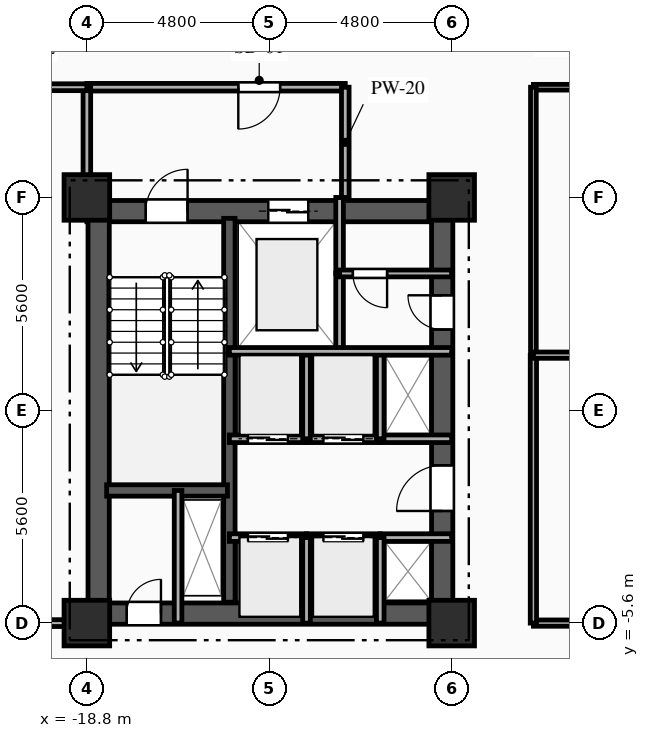
"""IFC4 building model, lengths in metres.
Left out: names, types, materials, properties, quantities, classifications, styles, units other than length and angle.
Written with IfcOpenShell. Run it as: python <this file> out.ifc"""

import sys

from ifc_helpers import new_model, si_unit, direction, frame, frame_2d, origin, origin_2d, place, context, subcontext, project, spatial, rectangle, extrude, element, fill, save


model = new_model("IFC4")
c1 = context("Model", 3, precision=1e-05, world=origin(), true_north=direction((0.0, 1.0)))
c2 = subcontext(c1, "Body", "Model", "MODEL_VIEW")
j1 = project(units=[si_unit("LENGTHUNIT", "METRE"), si_unit("PLANEANGLEUNIT", "RADIAN")], contexts=[c1])
p1 = place(None, origin())
s1 = spatial("IfcSite", under=j1, at=p1, CompositionType="ELEMENT")
p2 = place(p1, origin())
s2 = spatial("IfcBuilding", under=s1, at=p2, CompositionType="ELEMENT")
p3 = place(p2, frame((0.0, 0.0, 60.5)))
s3 = spatial("IfcBuildingStorey", under=s2, at=p3, CompositionType="ELEMENT", Elevation=60.5)
for number, where, z_axis, x_axis in (
    (1, (-18.8, -5.6, 0.0), (0.0, 0.0, 1.0), (1.0, 0.0, 0.0)),
    (2, (-18.8, 5.6, 0.0), (0.0, 0.0, 1.0), (1.0, 0.0, 0.0)),
    (3, (-9.2, -5.6, 0.0), (0.0, 0.0, 1.0), (1.0, 0.0, 0.0)),
    (4, (-9.2, 5.6, 0.0), (0.0, 0.0, 1.0), (1.0, 0.0, 0.0)),
):
    element("IfcColumn", number, at=place(p3, frame(where, z_axis=z_axis, x_axis=x_axis)), inside=s3, PredefinedType="COLUMN", context=c2, shape_type="SweptSolid", body=[
        extrude(rectangle(XDim=1.2, YDim=1.2, at=origin_2d()), origin(), (0.0, 0.0, 1.0), 3.35),
    ])
p4 = place(p3, frame((-18.8, 5.24, 0.0), z_axis=(0.0, 0.0, 1.0), x_axis=(1.0, 0.0, 0.0)))
e5 = element("IfcWall", 5, at=p4, inside=s3, PredefinedType="SHEAR", context=c2, shape_type="SweptSolid", body=[
    extrude(rectangle(XDim=9.6, YDim=0.56, at=frame_2d((4.8, 0.0))), origin(), (0.0, 0.0, 1.0), 3.035),
])
p5 = place(p4, frame((1.55, 0.0, 0.0)))
e6 = element("IfcOpeningElement", 6, at=p5, cuts=e5, PredefinedType="OPENING", context=c2, shape_type="SweptSolid", body=[
    extrude(rectangle(XDim=1.1, YDim=2.15, at=frame_2d((0.55, 1.075))), frame((0.0, 0.29, 0.0), z_axis=(0.0, -1.0, 0.0), x_axis=(1.0, 0.0, 0.0)), (0.0, 0.0, 1.0), 0.58),
])
p6 = place(p4, frame((4.775, 0.0, 0.0)))
e7 = element("IfcOpeningElement", 7, at=p6, cuts=e5, PredefinedType="OPENING", context=c2, shape_type="SweptSolid", body=[
    extrude(rectangle(XDim=1.05, YDim=2.1, at=frame_2d((0.525, 1.05))), frame((0.0, 0.29, 0.0), z_axis=(0.0, -1.0, 0.0), x_axis=(1.0, 0.0, 0.0)), (0.0, 0.0, 1.0), 0.58),
])
p7 = place(p3, frame((-18.8, -5.35, 0.0), z_axis=(0.0, 0.0, 1.0), x_axis=(1.0, 0.0, 0.0)))
e8 = element("IfcWall", 8, at=p7, inside=s3, PredefinedType="SHEAR", context=c2, shape_type="SweptSolid", body=[
    extrude(rectangle(XDim=9.6, YDim=0.56, at=frame_2d((4.8, 0.0))), origin(), (0.0, 0.0, 1.0), 3.035),
])
p8 = place(p7, frame((1.05, 0.0, 0.0)))
e9 = element("IfcOpeningElement", 9, at=p8, cuts=e8, PredefinedType="OPENING", context=c2, shape_type="SweptSolid", body=[
    extrude(rectangle(XDim=0.9, YDim=2.1, at=frame_2d((0.45, 1.05))), frame((0.0, 0.29, 0.0), z_axis=(0.0, -1.0, 0.0), x_axis=(1.0, 0.0, 0.0)), (0.0, 0.0, 1.0), 0.58),
])
p9 = place(p3, frame((-18.49, -5.05, 0.0), z_axis=(0.0, 0.0, 1.0), x_axis=(0.0, 1.0, 0.0)))
e10 = element("IfcWall", 10, at=p9, inside=s3, PredefinedType="SHEAR", context=c2, shape_type="SweptSolid", body=[
    extrude(rectangle(XDim=10.1, YDim=0.56, at=frame_2d((5.05, 0.0))), origin(), (0.0, 0.0, 1.0), 3.035),
])
p10 = place(p3, frame((-9.45, -5.05, 0.0), z_axis=(0.0, 0.0, 1.0), x_axis=(0.0, 1.0, 0.0)))
e11 = element("IfcWall", 11, at=p10, inside=s3, PredefinedType="SHEAR", context=c2, shape_type="SweptSolid", body=[
    extrude(rectangle(XDim=10.1, YDim=0.56, at=frame_2d((5.05, 0.0))), origin(), (0.0, 0.0, 1.0), 3.035),
])
p11 = place(p10, frame((7.175, 0.0, 0.0)))
e12 = element("IfcOpeningElement", 12, at=p11, cuts=e11, PredefinedType="OPENING", context=c2, shape_type="SweptSolid", body=[
    extrude(rectangle(XDim=0.9, YDim=2.1, at=frame_2d((0.45, 1.05))), frame((0.0, 0.29, 0.0), z_axis=(0.0, -1.0, 0.0), x_axis=(1.0, 0.0, 0.0)), (0.0, 0.0, 1.0), 0.58),
])
p12 = place(p10, frame((2.4, 0.0, 0.0)))
e13 = element("IfcOpeningElement", 13, at=p12, cuts=e11, PredefinedType="OPENING", context=c2, shape_type="SweptSolid", body=[
    extrude(rectangle(XDim=1.2, YDim=2.15, at=frame_2d((0.6, 1.075))), frame((0.0, 0.29, 0.0), z_axis=(0.0, -1.0, 0.0), x_axis=(1.0, 0.0, 0.0)), (0.0, 0.0, 1.0), 0.58),
])
p13 = place(p3, frame((-15.05, -5.05, 0.0), z_axis=(0.0, 0.0, 1.0), x_axis=(0.0, 1.0, 0.0)))
e14 = element("IfcWall", 14, at=p13, inside=s3, PredefinedType="SHEAR", context=c2, shape_type="SweptSolid", body=[
    extrude(rectangle(XDim=10.1, YDim=0.3, at=frame_2d((5.05, 0.0))), origin(), (0.0, 0.0, 1.0), 3.035),
])
p14 = place(p3, frame((-18.28, -2.11, 0.0), z_axis=(0.0, 0.0, 1.0), x_axis=(1.0, 0.0, 0.0)))
e15 = element("IfcWall", 15, at=p14, inside=s3, PredefinedType="SHEAR", context=c2, shape_type="SweptSolid", body=[
    extrude(rectangle(XDim=3.18, YDim=0.3, at=frame_2d((1.59, 0.0))), origin(), (0.0, 0.0, 1.0), 3.035),
])
p15 = place(p3, frame((-16.4, -5.6, 0.0), z_axis=(0.0, 0.0, 1.0), x_axis=(0.0, 1.0, 0.0)))
e16 = element("IfcWall", 16, at=p15, inside=s3, PredefinedType="PARTITIONING", context=c2, shape_type="SweptSolid", body=[
    extrude(rectangle(XDim=3.49, YDim=0.2, at=frame_2d((1.745, 0.0))), origin(), (0.0, 0.0, 1.0), 3.035),
])
p16 = place(p3, frame((-12.15, 1.55, 0.0), z_axis=(0.0, 0.0, 1.0), x_axis=(0.0, 1.0, 0.0)))
e17 = element("IfcWall", 17, at=p16, inside=s3, PredefinedType="PARTITIONING", context=c2, shape_type="SweptSolid", body=[
    extrude(rectangle(XDim=2.05, YDim=0.2, at=frame_2d((1.025, 0.0))), origin(), (0.0, 0.0, 1.0), 3.035),
])
p17 = place(p3, frame((-12.15, 3.6, 0.0), z_axis=(0.0, 0.0, 1.0), x_axis=(0.0, 1.0, 0.0)))
e18 = element("IfcWall", 18, at=p17, inside=s3, PredefinedType="PARTITIONING", context=c2, shape_type="SweptSolid", body=[
    extrude(rectangle(XDim=2.0, YDim=0.2, at=frame_2d((1.0, 0.0))), origin(), (0.0, 0.0, 1.0), 3.035),
])
p18 = place(p3, frame((-12.0, 8.5, 0.0), z_axis=(0.0, 0.0, 1.0), x_axis=(-1.0, 0.0, 0.0)))
e19 = element("IfcWall", 19, at=p18, inside=s3, PredefinedType="PARTITIONING", context=c2, shape_type="SweptSolid", body=[
    extrude(rectangle(XDim=6.8, YDim=0.2, at=frame_2d((3.4, 0.0))), origin(), (0.0, 0.0, 1.0), 3.035),
])
p19 = place(p18, frame((1.715, 0.0, 0.0)))
e20 = element("IfcOpeningElement", 20, at=p19, cuts=e19, PredefinedType="OPENING", context=c2, shape_type="SweptSolid", body=[
    extrude(rectangle(XDim=1.1, YDim=2.15, at=frame_2d((0.55, 1.075))), frame((0.0, 0.11, 0.0), z_axis=(0.0, -1.0, 0.0), x_axis=(1.0, 0.0, 0.0)), (0.0, 0.0, 1.0), 0.22),
])
p20 = place(p3, frame((-12.0, 5.6, 0.0), z_axis=(0.0, 0.0, 1.0), x_axis=(0.0, 1.0, 0.0)))
e21 = element("IfcWall", 21, at=p20, inside=s3, PredefinedType="PARTITIONING", context=c2, shape_type="SweptSolid", body=[
    extrude(rectangle(XDim=2.9, YDim=0.2, at=frame_2d((1.45, 0.0))), origin(), (0.0, 0.0, 1.0), 3.035),
])
p21 = place(p3, frame((-18.8, 8.5, 0.0), z_axis=(0.0, 0.0, 1.0), x_axis=(0.0, -1.0, 0.0)))
e22 = element("IfcWall", 22, at=p21, inside=s3, PredefinedType="PARTITIONING", context=c2, shape_type="SweptSolid", body=[
    extrude(rectangle(XDim=2.9, YDim=0.2, at=frame_2d((1.45, 0.0))), origin(), (0.0, 0.0, 1.0), 2.52),
])
p22 = place(p3, frame((-9.2, 3.6, 0.0), z_axis=(0.0, 0.0, 1.0), x_axis=(-1.0, 0.0, 0.0)))
e23 = element("IfcWall", 23, at=p22, inside=s3, PredefinedType="PARTITIONING", context=c2, shape_type="SweptSolid", body=[
    extrude(rectangle(XDim=2.95, YDim=0.18, at=frame_2d((1.475, 0.0))), origin(), (0.0, 0.0, 1.0), 3.035),
])
p23 = place(p22, frame((1.7, 0.0, 0.0)))
e24 = element("IfcOpeningElement", 24, at=p23, cuts=e23, PredefinedType="OPENING", context=c2, shape_type="SweptSolid", body=[
    extrude(rectangle(XDim=0.9, YDim=2.1, at=frame_2d((0.45, 1.05))), frame((0.0, 0.1, 0.0), z_axis=(0.0, -1.0, 0.0), x_axis=(1.0, 0.0, 0.0)), (0.0, 0.0, 1.0), 0.2),
])
p24 = place(p3, frame((-15.05, -3.35, 0.0), z_axis=(0.0, 0.0, 1.0), x_axis=(1.0, 0.0, 0.0)))
e25 = element("IfcWall", 25, at=p24, inside=s3, PredefinedType="PARTITIONING", context=c2, shape_type="SweptSolid", body=[
    extrude(rectangle(XDim=2.03, YDim=0.2, at=frame_2d((1.015, 0.0))), origin(), (0.0, 0.0, 1.0), 3.035),
])
p25 = place(p24, frame((0.49, 0.0, 0.0)))
e26 = element("IfcOpeningElement", 26, at=p25, cuts=e25, PredefinedType="OPENING", context=c2, shape_type="SweptSolid", body=[
    extrude(rectangle(XDim=1.05, YDim=2.1, at=frame_2d((0.525, 1.05))), frame((0.0, 0.11, 0.0), z_axis=(0.0, -1.0, 0.0), x_axis=(1.0, 0.0, 0.0)), (0.0, 0.0, 1.0), 0.22),
])
p26 = place(p3, frame((-13.02, -3.35, 0.0), z_axis=(0.0, 0.0, 1.0), x_axis=(1.0, 0.0, 0.0)))
e27 = element("IfcWall", 27, at=p26, inside=s3, PredefinedType="PARTITIONING", context=c2, shape_type="SweptSolid", body=[
    extrude(rectangle(XDim=1.94, YDim=0.2, at=frame_2d((0.97, 0.0))), origin(), (0.0, 0.0, 1.0), 3.035),
])
p27 = place(p26, frame((0.445, 0.0, 0.0)))
e28 = element("IfcOpeningElement", 28, at=p27, cuts=e27, PredefinedType="OPENING", context=c2, shape_type="SweptSolid", body=[
    extrude(rectangle(XDim=1.05, YDim=2.1, at=frame_2d((0.525, 1.05))), frame((0.0, 0.11, 0.0), z_axis=(0.0, -1.0, 0.0), x_axis=(1.0, 0.0, 0.0)), (0.0, 0.0, 1.0), 0.22),
])
p28 = place(p3, frame((-11.08, -3.35, 0.0), z_axis=(0.0, 0.0, 1.0), x_axis=(1.0, 0.0, 0.0)))
e29 = element("IfcWall", 29, at=p28, inside=s3, PredefinedType="PARTITIONING", context=c2, shape_type="SweptSolid", body=[
    extrude(rectangle(XDim=1.88, YDim=0.2, at=frame_2d((0.94, 0.0))), origin(), (0.0, 0.0, 1.0), 2.75),
])
p29 = place(p3, frame((-13.02, -0.75, 0.0), z_axis=(0.0, 0.0, 1.0), x_axis=(-1.0, 0.0, 0.0)))
e30 = element("IfcWall", 30, at=p29, inside=s3, PredefinedType="PARTITIONING", context=c2, shape_type="SweptSolid", body=[
    extrude(rectangle(XDim=2.03, YDim=0.2, at=frame_2d((1.015, 0.0))), origin(), (0.0, 0.0, 1.0), 3.035),
])
p30 = place(p29, frame((0.49, 0.0, 0.0)))
e31 = element("IfcOpeningElement", 31, at=p30, cuts=e30, PredefinedType="OPENING", context=c2, shape_type="SweptSolid", body=[
    extrude(rectangle(XDim=1.05, YDim=2.1, at=frame_2d((0.525, 1.05))), frame((0.0, 0.11, 0.0), z_axis=(0.0, -1.0, 0.0), x_axis=(1.0, 0.0, 0.0)), (0.0, 0.0, 1.0), 0.22),
])
p31 = place(p3, frame((-11.08, -0.75, 0.0), z_axis=(0.0, 0.0, 1.0), x_axis=(-1.0, 0.0, 0.0)))
e32 = element("IfcWall", 32, at=p31, inside=s3, PredefinedType="PARTITIONING", context=c2, shape_type="SweptSolid", body=[
    extrude(rectangle(XDim=1.94, YDim=0.2, at=frame_2d((0.97, 0.0))), origin(), (0.0, 0.0, 1.0), 3.035),
])
p32 = place(p31, frame((0.445, 0.0, 0.0)))
e33 = element("IfcOpeningElement", 33, at=p32, cuts=e32, PredefinedType="OPENING", context=c2, shape_type="SweptSolid", body=[
    extrude(rectangle(XDim=1.05, YDim=2.1, at=frame_2d((0.525, 1.05))), frame((0.0, 0.11, 0.0), z_axis=(0.0, -1.0, 0.0), x_axis=(1.0, 0.0, 0.0)), (0.0, 0.0, 1.0), 0.22),
])
p33 = place(p3, frame((-9.2, -0.75, 0.0), z_axis=(0.0, 0.0, 1.0), x_axis=(-1.0, 0.0, 0.0)))
e34 = element("IfcWall", 34, at=p33, inside=s3, PredefinedType="PARTITIONING", context=c2, shape_type="SweptSolid", body=[
    extrude(rectangle(XDim=1.88, YDim=0.2, at=frame_2d((0.94, 0.0))), origin(), (0.0, 0.0, 1.0), 3.035),
])
for number, where, z_axis, x_axis in (
    (35, (-13.02, -5.6, 0.0), (0.0, 0.0, 1.0), (0.0, 1.0, 0.0)),
    (36, (-11.08, -5.6, 0.0), (0.0, 0.0, 1.0), (0.0, 1.0, 0.0)),
):
    element("IfcWall", number, at=place(p3, frame(where, z_axis=z_axis, x_axis=x_axis)), inside=s3, PredefinedType="PARTITIONING", context=c2, shape_type="SweptSolid", body=[
        extrude(rectangle(XDim=2.25, YDim=0.2, at=frame_2d((1.125, 0.0))), origin(), (0.0, 0.0, 1.0), 3.035),
    ])
for number, where, z_axis, x_axis in (
    (37, (-13.02, -0.75, 0.0), (0.0, 0.0, 1.0), (0.0, 1.0, 0.0)),
    (38, (-11.08, -0.75, 0.0), (0.0, 0.0, 1.0), (0.0, 1.0, 0.0)),
):
    element("IfcWall", number, at=place(p3, frame(where, z_axis=z_axis, x_axis=x_axis)), inside=s3, PredefinedType="PARTITIONING", context=c2, shape_type="SweptSolid", body=[
        extrude(rectangle(XDim=2.3, YDim=0.2, at=frame_2d((1.15, 0.0))), origin(), (0.0, 0.0, 1.0), 3.035),
    ])
p34 = place(p3, frame((-18.8, 8.5, 0.0), z_axis=(0.0, 0.0, 1.0), x_axis=(-1.0, 0.0, 0.0)))
e39 = element("IfcWall", 39, at=p34, inside=s3, PredefinedType="PARTITIONING", context=c2, shape_type="SweptSolid", body=[
    extrude(rectangle(XDim=2.65, YDim=0.18, at=frame_2d((1.325, 0.0))), origin(), (0.0, 0.0, 1.0), 3.035),
])
p35 = place(p34, frame((1.009, 0.0, 0.0)))
e40 = element("IfcOpeningElement", 40, at=p35, cuts=e39, PredefinedType="OPENING", context=c2, shape_type="SweptSolid", body=[
    extrude(rectangle(XDim=1.0, YDim=2.15, at=frame_2d((0.5, 1.075))), frame((0.0, 0.1, 0.0), z_axis=(0.0, -1.0, 0.0), x_axis=(1.0, 0.0, 0.0)), (0.0, 0.0, 1.0), 0.2),
])
p36 = place(p3, frame((0.0, 8.5, 0.0), z_axis=(0.0, 0.0, 1.0), x_axis=(-1.0, 0.0, 0.0)))
e41 = element("IfcWall", 41, at=p36, inside=s3, PredefinedType="PARTITIONING", context=c2, shape_type="SweptSolid", body=[
    extrude(rectangle(XDim=7.05, YDim=0.15, at=frame_2d((3.525, 0.0))), origin(), (0.0, 0.0, 1.0), 3.035),
])
p37 = place(p36, frame((1.185, 0.0, 0.0)))
e42 = element("IfcOpeningElement", 42, at=p37, cuts=e41, PredefinedType="OPENING", context=c2, shape_type="SweptSolid", body=[
    extrude(rectangle(XDim=1.05, YDim=2.15, at=frame_2d((0.525, 1.075))), frame((0.0, 0.085, 0.0), z_axis=(0.0, -1.0, 0.0), x_axis=(1.0, 0.0, 0.0)), (0.0, 0.0, 1.0), 0.17),
])
p38 = place(p3, frame((-21.45, -5.6, 0.0), z_axis=(0.0, 0.0, 1.0), x_axis=(1.0, 0.0, 0.0)))
e43 = element("IfcWall", 43, at=p38, inside=s3, PredefinedType="PARTITIONING", context=c2, shape_type="SweptSolid", body=[
    extrude(rectangle(XDim=2.65, YDim=0.18, at=frame_2d((1.325, 0.0))), origin(), (0.0, 0.0, 1.0), 3.035),
])
p39 = place(p3, frame((-7.05, -5.6, 0.0), z_axis=(0.0, 0.0, 1.0), x_axis=(1.0, 0.0, 0.0)))
e44 = element("IfcWall", 44, at=p39, inside=s3, PredefinedType="PARTITIONING", context=c2, shape_type="SweptSolid", body=[
    extrude(rectangle(XDim=7.05, YDim=0.165, at=frame_2d((3.525, 0.0))), origin(), (0.0, 0.0, 1.0), 2.52),
])
p40 = place(p39, frame((4.728, 0.0, 0.0)))
e45 = element("IfcOpeningElement", 45, at=p40, cuts=e44, PredefinedType="OPENING", context=c2, shape_type="SweptSolid", body=[
    extrude(rectangle(XDim=1.15, YDim=2.15, at=frame_2d((0.575, 1.075))), frame((0.0, 0.093, 0.0), z_axis=(0.0, -1.0, 0.0), x_axis=(1.0, 0.0, 0.0)), (0.0, 0.0, 1.0), 0.185),
])
p41 = place(p3, frame((-7.05, 1.45, 0.0), z_axis=(0.0, 0.0, 1.0), x_axis=(0.0, -1.0, 0.0)))
e46 = element("IfcWall", 46, at=p41, inside=s3, PredefinedType="PARTITIONING", context=c2, shape_type="SweptSolid", body=[
    extrude(rectangle(XDim=7.05, YDim=0.165, at=frame_2d((3.525, 0.0))), origin(), (0.0, 0.0, 1.0), 3.035),
])
p42 = place(p3, frame((-7.05, 8.5, 0.0), z_axis=(0.0, 0.0, 1.0), x_axis=(0.0, -1.0, 0.0)))
e47 = element("IfcWall", 47, at=p42, inside=s3, PredefinedType="PARTITIONING", context=c2, shape_type="SweptSolid", body=[
    extrude(rectangle(XDim=7.05, YDim=0.15, at=frame_2d((3.525, 0.0))), origin(), (0.0, 0.0, 1.0), 3.035),
])
p43 = place(p3, frame((-7.05, 1.45, 0.0), z_axis=(0.0, 0.0, 1.0), x_axis=(1.0, 0.0, 0.0)))
e48 = element("IfcWall", 48, at=p43, inside=s3, PredefinedType="PARTITIONING", context=c2, shape_type="SweptSolid", body=[
    extrude(rectangle(XDim=14.1, YDim=0.165, at=frame_2d((7.05, 0.0))), origin(), (0.0, 0.0, 1.0), 3.035),
])
p44 = place(p3, frame((-15.05, 1.55, 0.0), z_axis=(0.0, 0.0, 1.0), x_axis=(1.0, 0.0, 0.0)))
e49 = element("IfcWall", 49, at=p44, inside=s3, PredefinedType="PARTITIONING", context=c2, shape_type="SweptSolid", body=[
    extrude(rectangle(XDim=5.85, YDim=0.2, at=frame_2d((2.925, 0.0))), origin(), (0.0, 0.0, 1.0), 3.035),
])
p45 = place(p5, origin())
e50 = element("IfcDoor", 50, at=p45, inside=s3, OperationType="SINGLE_SWING_RIGHT", PredefinedType="DOOR", context=c2, shape_type="SweptSolid", body=[
    extrude(rectangle(XDim=1.1, YDim=2.15, at=frame_2d((0.55, 1.075))), frame((0.0, 0.025, 0.0), z_axis=(0.0, -1.0, 0.0), x_axis=(1.0, 0.0, 0.0)), (0.0, 0.0, 1.0), 0.05),
])
fill(e6, e50)
p46 = place(p6, origin())
e51 = element("IfcDoor", 51, at=p46, inside=s3, OperationType="DOUBLE_DOOR_SLIDING", PredefinedType="DOOR", context=c2, shape_type="SweptSolid", body=[
    extrude(rectangle(XDim=1.05, YDim=2.1, at=frame_2d((0.525, 1.05))), frame((0.0, 0.025, 0.0), z_axis=(0.0, -1.0, 0.0), x_axis=(1.0, 0.0, 0.0)), (0.0, 0.0, 1.0), 0.05),
])
fill(e7, e51)
p47 = place(p8, origin())
e52 = element("IfcDoor", 52, at=p47, inside=s3, OperationType="SINGLE_SWING_RIGHT", PredefinedType="DOOR", context=c2, shape_type="SweptSolid", body=[
    extrude(rectangle(XDim=0.9, YDim=2.1, at=frame_2d((0.45, 1.05))), frame((0.0, 0.025, 0.0), z_axis=(0.0, -1.0, 0.0), x_axis=(1.0, 0.0, 0.0)), (0.0, 0.0, 1.0), 0.05),
])
fill(e9, e52)
p48 = place(p19, origin())
e53 = element("IfcDoor", 53, at=p48, inside=s3, OperationType="SINGLE_SWING_RIGHT", PredefinedType="DOOR", context=c2, shape_type="SweptSolid", body=[
    extrude(rectangle(XDim=1.1, YDim=2.15, at=frame_2d((0.55, 1.075))), frame((0.0, 0.025, 0.0), z_axis=(0.0, -1.0, 0.0), x_axis=(1.0, 0.0, 0.0)), (0.0, 0.0, 1.0), 0.05),
])
fill(e20, e53)
p49 = place(p23, origin())
e54 = element("IfcDoor", 54, at=p49, inside=s3, OperationType="SINGLE_SWING_LEFT", PredefinedType="DOOR", context=c2, shape_type="SweptSolid", body=[
    extrude(rectangle(XDim=0.9, YDim=2.1, at=frame_2d((0.45, 1.05))), frame((0.0, 0.025, 0.0), z_axis=(0.0, -1.0, 0.0), x_axis=(1.0, 0.0, 0.0)), (0.0, 0.0, 1.0), 0.05),
])
fill(e24, e54)
p50 = place(p11, origin())
e55 = element("IfcDoor", 55, at=p50, inside=s3, OperationType="SINGLE_SWING_RIGHT", PredefinedType="DOOR", context=c2, shape_type="SweptSolid", body=[
    extrude(rectangle(XDim=0.9, YDim=2.1, at=frame_2d((0.45, 1.05))), frame((0.0, 0.025, 0.0), z_axis=(0.0, -1.0, 0.0), x_axis=(1.0, 0.0, 0.0)), (0.0, 0.0, 1.0), 0.05),
])
fill(e12, e55)
p51 = place(p25, origin())
e56 = element("IfcDoor", 56, at=p51, inside=s3, OperationType="DOUBLE_DOOR_SLIDING", PredefinedType="DOOR", context=c2, shape_type="SweptSolid", body=[
    extrude(rectangle(XDim=1.05, YDim=2.1, at=frame_2d((0.525, 1.05))), frame((0.0, 0.025, 0.0), z_axis=(0.0, -1.0, 0.0), x_axis=(1.0, 0.0, 0.0)), (0.0, 0.0, 1.0), 0.05),
])
fill(e26, e56)
p52 = place(p27, origin())
e57 = element("IfcDoor", 57, at=p52, inside=s3, OperationType="DOUBLE_DOOR_SLIDING", PredefinedType="DOOR", context=c2, shape_type="SweptSolid", body=[
    extrude(rectangle(XDim=1.05, YDim=2.1, at=frame_2d((0.525, 1.05))), frame((0.0, 0.025, 0.0), z_axis=(0.0, -1.0, 0.0), x_axis=(1.0, 0.0, 0.0)), (0.0, 0.0, 1.0), 0.05),
])
fill(e28, e57)
p53 = place(p30, origin())
e58 = element("IfcDoor", 58, at=p53, inside=s3, OperationType="DOUBLE_DOOR_SLIDING", PredefinedType="DOOR", context=c2, shape_type="SweptSolid", body=[
    extrude(rectangle(XDim=1.05, YDim=2.1, at=frame_2d((0.525, 1.05))), frame((0.0, 0.025, 0.0), z_axis=(0.0, -1.0, 0.0), x_axis=(1.0, 0.0, 0.0)), (0.0, 0.0, 1.0), 0.05),
])
fill(e31, e58)
p54 = place(p32, origin())
e59 = element("IfcDoor", 59, at=p54, inside=s3, OperationType="DOUBLE_DOOR_SLIDING", PredefinedType="DOOR", context=c2, shape_type="SweptSolid", body=[
    extrude(rectangle(XDim=1.05, YDim=2.1, at=frame_2d((0.525, 1.05))), frame((0.0, 0.025, 0.0), z_axis=(0.0, -1.0, 0.0), x_axis=(1.0, 0.0, 0.0)), (0.0, 0.0, 1.0), 0.05),
])
fill(e33, e59)
p55 = place(p12, origin())
e60 = element("IfcDoor", 60, at=p55, inside=s3, OperationType="SINGLE_SWING_LEFT", PredefinedType="DOOR", context=c2, shape_type="SweptSolid", body=[
    extrude(rectangle(XDim=1.2, YDim=2.15, at=frame_2d((0.6, 1.075))), frame((0.0, 0.025, 0.0), z_axis=(0.0, -1.0, 0.0), x_axis=(1.0, 0.0, 0.0)), (0.0, 0.0, 1.0), 0.05),
])
fill(e13, e60)
save(model, sys.argv[1])
